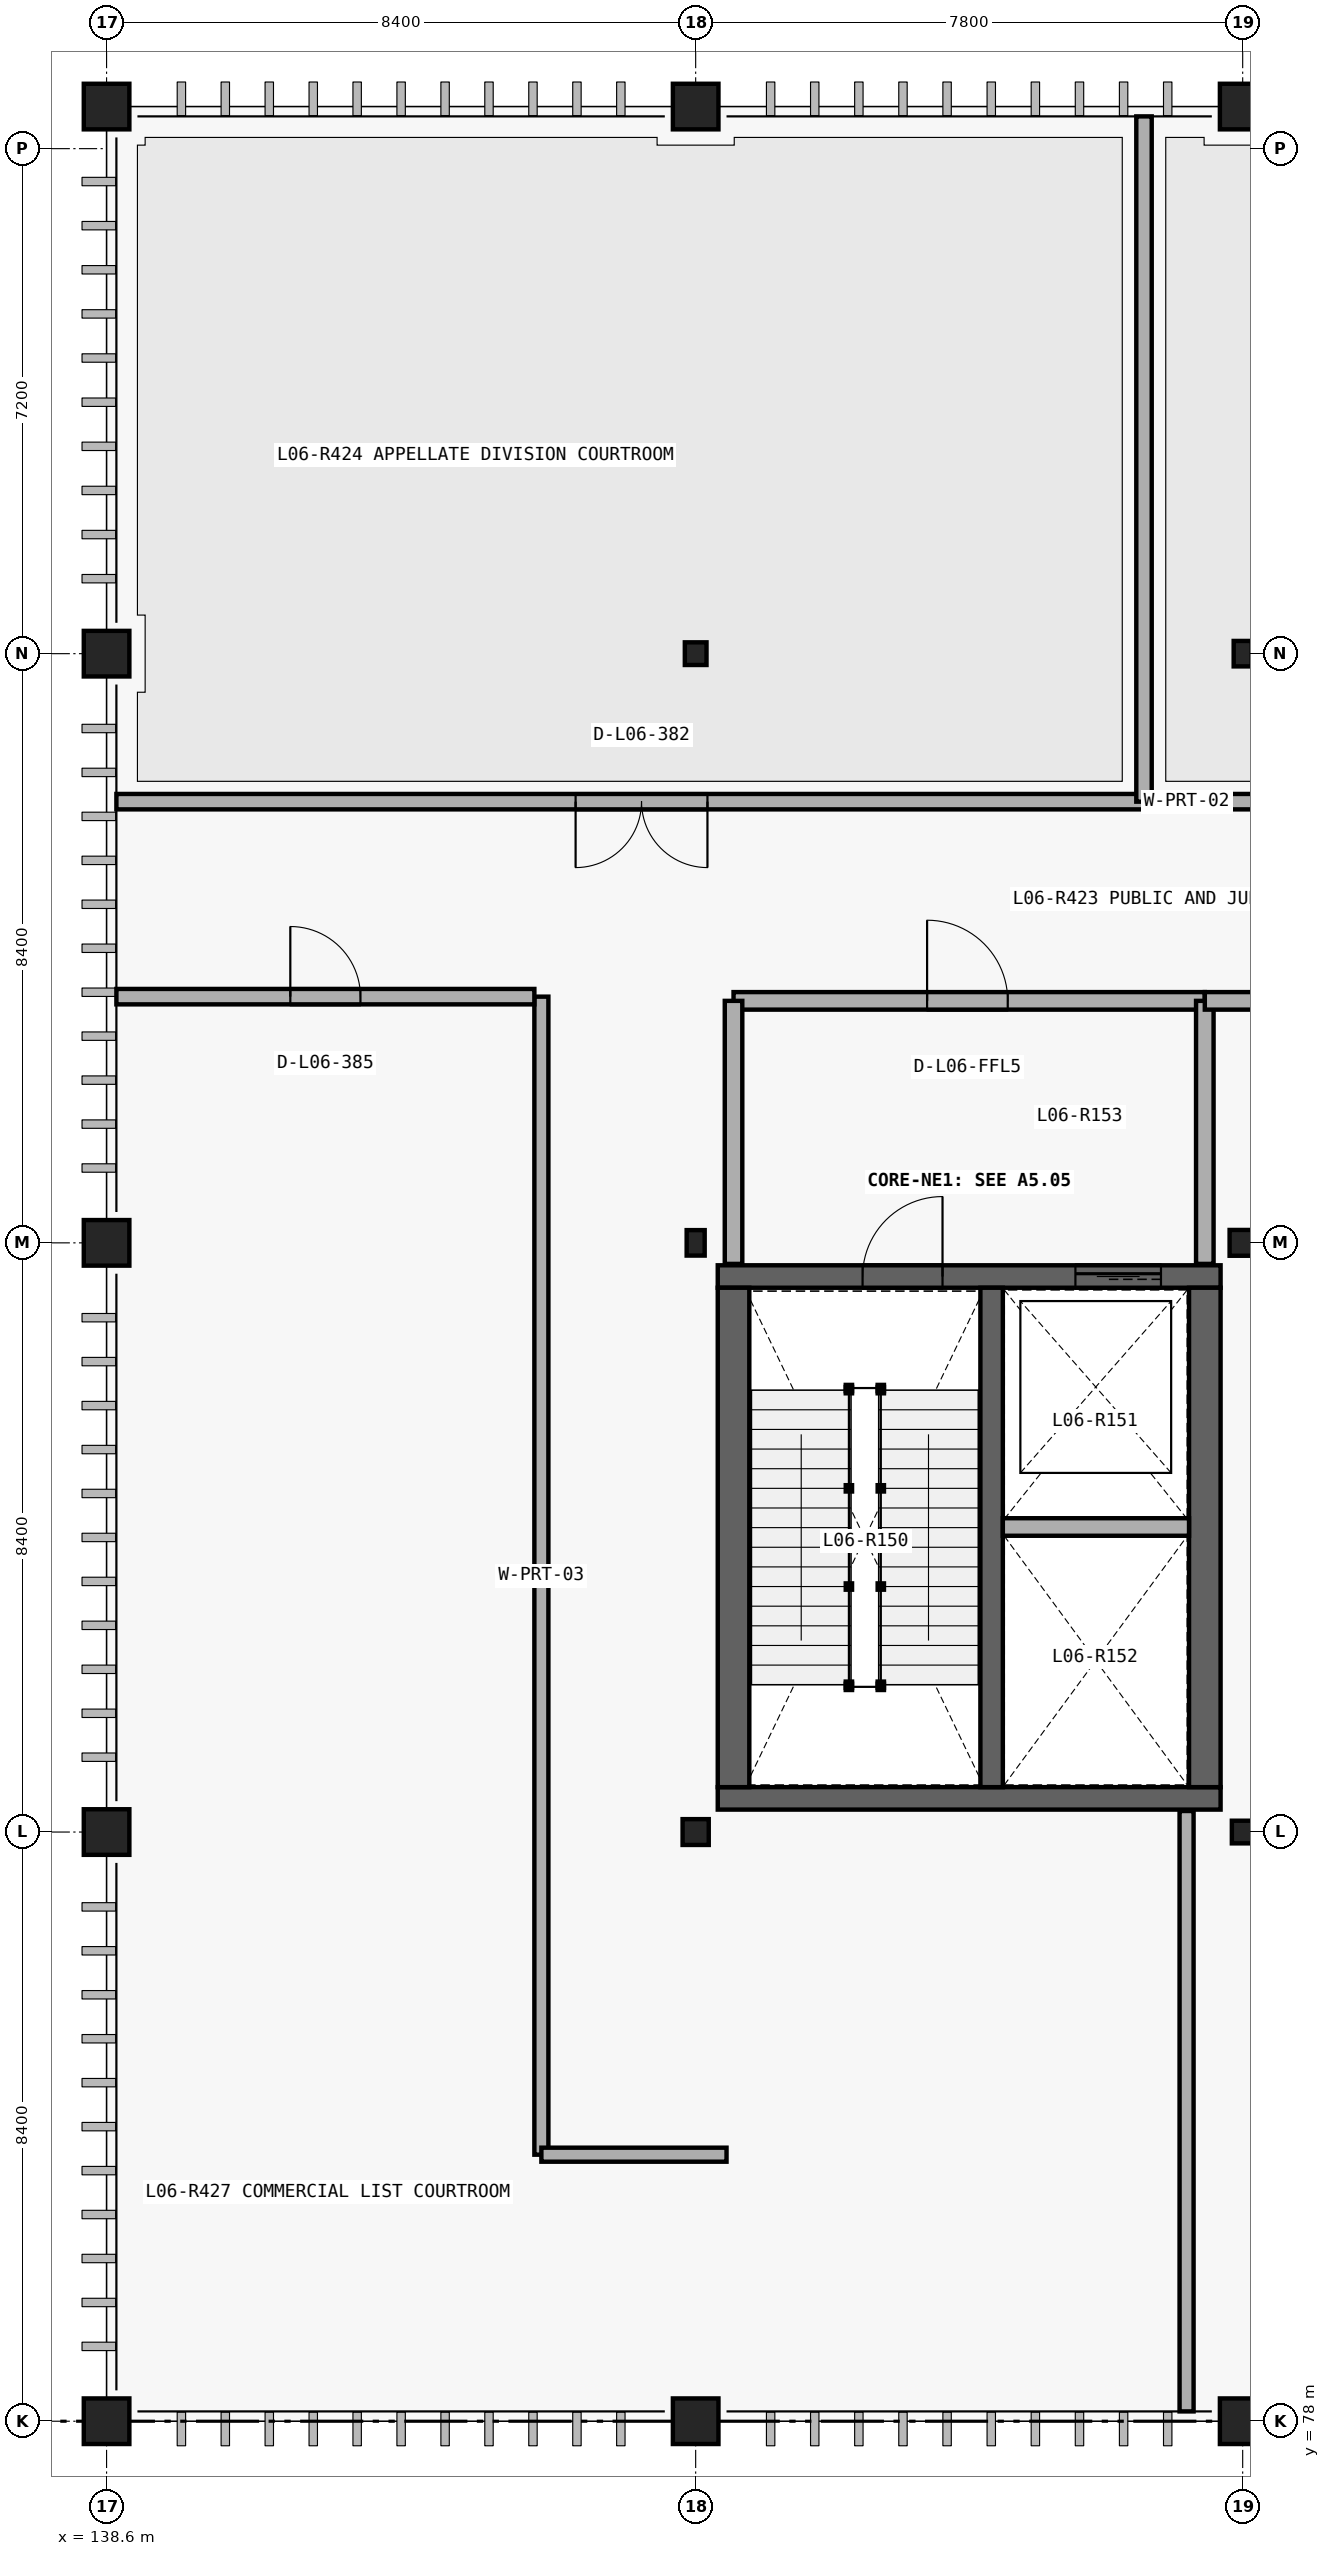
"""IFC4 building model, lengths in metres.
Left out: names, types, materials, properties, quantities, classifications, styles, units other than length and angle.
Written with IfcOpenShell. Run it as: python <this file> out.ifc"""

import sys

from ifc_helpers import new_model, si_unit, direction, frame, frame_2d, origin_with_axes, origin_2d_with_axis, place, context, subcontext, project, spatial, rectangle, circle, i_section, extrude, element, fill, save


model = new_model("IFC4")
c1 = context("Model", 3, precision=1e-05, world=origin_with_axes(), true_north=direction((0.0, 1.0)))
c2 = subcontext(c1, "Body", "Model", "MODEL_VIEW")
j1 = project(units=[si_unit("LENGTHUNIT", "METRE"), si_unit("PLANEANGLEUNIT", "RADIAN")], contexts=[c1])
p1 = place(None, origin_with_axes())
s1 = spatial("IfcSite", under=j1, at=p1, CompositionType="ELEMENT")
p2 = place(p1, origin_with_axes())
s2 = spatial("IfcBuilding", under=s1, at=p2, CompositionType="ELEMENT")
p3 = place(p2, frame((0.0, 0.0, 29.7), z_axis=(0.0, 0.0, 1.0), x_axis=(1.0, 0.0, 0.0)))
s3 = spatial("IfcBuildingStorey", under=s2, at=p3, CompositionType="ELEMENT", Elevation=29.7)
p4 = place(None, frame((147.315, 86.88, 29.7), z_axis=(0.0, 0.0, 1.0), x_axis=(1.0, 0.0, 0.0)))
e1 = element("IfcWall", 1, at=p4, inside=s3, PredefinedType="SHEAR", context=c2, shape_type="SweptSolid", body=[
    extrude(rectangle(XDim=7.17, YDim=0.32, at=frame_2d((3.585, 0.0), x_axis=(1.0, 0.0))), origin_with_axes(), (0.0, 0.0, 1.0), 4.8),
])
p5 = place(None, frame((154.485, 94.32, 29.7), z_axis=(0.0, 0.0, 1.0), x_axis=(-1.0, 0.0, 0.0)))
e2 = element("IfcWall", 2, at=p5, inside=s3, PredefinedType="SHEAR", context=c2, shape_type="SweptSolid", body=[
    extrude(rectangle(XDim=7.17, YDim=0.32, at=frame_2d((3.585, 0.0), x_axis=(1.0, 0.0))), origin_with_axes(), (0.0, 0.0, 1.0), 4.8),
])
p6 = place(None, frame((149.95, 94.32, 29.7), z_axis=(0.0, 0.0, 1.0), x_axis=(-1.0, 0.0, 0.0)))
e3 = element("IfcOpeningElement", 3, at=p6, cuts=e2, PredefinedType="OPENING", context=c2, shape_type="SweptSolid", body=[
    extrude(rectangle(XDim=1.14, YDim=2.18, at=frame_2d((0.0, 1.09), x_axis=(1.0, 0.0))), frame((0.0, 0.17, 0.0), z_axis=(0.0, -1.0, 0.0), x_axis=(1.0, 0.0, 0.0)), (0.0, 0.0, 1.0), 0.34),
])
p7 = place(None, frame((153.025, 94.32, 29.7), z_axis=(0.0, 0.0, 1.0), x_axis=(-1.0, 0.0, 0.0)))
e4 = element("IfcOpeningElement", 4, at=p7, cuts=e2, PredefinedType="OPENING", context=c2, shape_type="SweptSolid", body=[
    extrude(rectangle(XDim=1.22, YDim=2.28, at=frame_2d((0.0, 1.14), x_axis=(1.0, 0.0))), frame((0.0, 0.17, 0.0), z_axis=(0.0, -1.0, 0.0), x_axis=(1.0, 0.0, 0.0)), (0.0, 0.0, 1.0), 0.34),
])
for number, where, z_axis, x_axis in (
    (5, (154.26, 87.04, 29.7), (0.0, 0.0, 1.0), (0.0, 1.0, 0.0)),
    (6, (147.54, 94.16, 29.7), (0.0, 0.0, 1.0), (0.0, -1.0, 0.0)),
):
    element("IfcWall", number, at=place(None, frame(where, z_axis=z_axis, x_axis=x_axis)), inside=s3, PredefinedType="SHEAR", context=c2, shape_type="SweptSolid", body=[
        extrude(rectangle(XDim=7.12, YDim=0.45, at=frame_2d((3.56, 0.0), x_axis=(1.0, 0.0))), origin_with_axes(), (0.0, 0.0, 1.0), 4.8),
    ])
p8 = place(None, frame((151.22, 87.04, 29.7), z_axis=(0.0, 0.0, 1.0), x_axis=(0.0, 1.0, 0.0)))
e7 = element("IfcWall", 7, at=p8, inside=s3, PredefinedType="SHEAR", context=c2, shape_type="SweptSolid", body=[
    extrude(rectangle(XDim=7.12, YDim=0.32, at=frame_2d((3.56, 0.0), x_axis=(1.0, 0.0))), origin_with_axes(), (0.0, 0.0, 1.0), 4.8),
])
p9 = place(None, frame((151.38, 90.749, 29.7), z_axis=(0.0, 0.0, 1.0), x_axis=(1.0, 0.0, 0.0)))
e8 = element("IfcWall", 8, at=p9, inside=s3, PredefinedType="PARTITIONING", context=c2, shape_type="SweptSolid", body=[
    extrude(rectangle(XDim=2.655, YDim=0.25, at=frame_2d((1.327, 0.0), x_axis=(1.0, 0.0))), origin_with_axes(), (0.0, 0.0, 1.0), 4.48),
])
p10 = place(None, frame((154.26, 98.25, 29.7), z_axis=(0.0, 0.0, 1.0), x_axis=(-1.0, 0.0, 0.0)))
e9 = element("IfcWall", 9, at=p10, inside=s3, PredefinedType="PARTITIONING", context=c2, shape_type="SweptSolid", body=[
    extrude(rectangle(XDim=6.72, YDim=0.25, at=frame_2d((3.36, 0.0), x_axis=(1.0, 0.0))), origin_with_axes(), (0.0, 0.0, 1.0), 4.48),
])
p11 = place(None, frame((150.875, 98.25, 29.7), z_axis=(0.0, 0.0, 1.0), x_axis=(-1.0, 0.0, 0.0)))
e10 = element("IfcOpeningElement", 10, at=p11, cuts=e9, PredefinedType="OPENING", context=c2, shape_type="SweptSolid", body=[
    extrude(rectangle(XDim=1.15, YDim=2.25, at=frame_2d((0.0, 1.125), x_axis=(1.0, 0.0))), frame((0.0, 0.135, 0.0), z_axis=(0.0, -1.0, 0.0), x_axis=(1.0, 0.0, 0.0)), (0.0, 0.0, 1.0), 0.27),
])
for number, where, z_axis, x_axis in (
    (11, (147.54, 94.5, 29.7), (0.0, 0.0, 1.0), (0.0, 1.0, 0.0)),
    (12, (154.26, 94.5, 29.7), (0.0, 0.0, 1.0), (0.0, 1.0, 0.0)),
):
    element("IfcWall", number, at=place(None, frame(where, z_axis=z_axis, x_axis=x_axis)), inside=s3, PredefinedType="PARTITIONING", context=c2, shape_type="SweptSolid", body=[
        extrude(rectangle(XDim=3.75, YDim=0.25, at=frame_2d((1.875, 0.0), x_axis=(1.0, 0.0))), origin_with_axes(), (0.0, 0.0, 1.0), 4.48),
    ])
p12 = place(None, frame((154.26, 98.25, 29.7), z_axis=(0.0, 0.0, 1.0), x_axis=(1.0, 0.0, 0.0)))
e13 = element("IfcWall", 13, at=p12, inside=s3, PredefinedType="PARTITIONING", context=c2, shape_type="SweptSolid", body=[
    extrude(rectangle(XDim=1.08, YDim=0.25, at=frame_2d((0.54, 0.0), x_axis=(1.0, 0.0))), origin_with_axes(), (0.0, 0.0, 1.0), 4.48),
])
p13 = place(None, frame((144.8, 81.8, 29.7), z_axis=(0.0, 0.0, 1.0), x_axis=(0.0, 1.0, 0.0)))
e14 = element("IfcWall", 14, at=p13, inside=s3, PredefinedType="PARTITIONING", context=c2, shape_type="SweptSolid", body=[
    extrude(rectangle(XDim=16.51, YDim=0.2, at=frame_2d((8.255, 0.0), x_axis=(1.0, 0.0))), origin_with_axes(), (0.0, 0.0, 1.0), 4.48),
])
p14 = place(None, frame((144.8, 81.8, 29.7), z_axis=(0.0, 0.0, 1.0), x_axis=(1.0, 0.0, 0.0)))
e15 = element("IfcWall", 15, at=p14, inside=s3, PredefinedType="PARTITIONING", context=c2, shape_type="SweptSolid", body=[
    extrude(rectangle(XDim=2.64, YDim=0.2, at=frame_2d((1.32, 0.0), x_axis=(1.0, 0.0))), origin_with_axes(), (0.0, 0.0, 1.0), 4.48),
])
p15 = place(None, frame((138.74, 101.09, 29.7), z_axis=(0.0, 0.0, 1.0), x_axis=(1.0, 0.0, 0.0)))
e16 = element("IfcWall", 16, at=p15, inside=s3, PredefinedType="PARTITIONING", context=c2, shape_type="SweptSolid", body=[
    extrude(rectangle(XDim=30.52, YDim=0.22, at=frame_2d((15.26, 0.0), x_axis=(1.0, 0.0))), origin_with_axes(), (0.0, 0.0, 1.0), 4.48),
])
p16 = place(None, frame((146.228, 101.09, 29.7), z_axis=(0.0, 0.0, 1.0), x_axis=(1.0, 0.0, 0.0)))
e17 = element("IfcOpeningElement", 17, at=p16, cuts=e16, PredefinedType="OPENING", context=c2, shape_type="SweptSolid", body=[
    extrude(rectangle(XDim=1.88, YDim=2.56, at=frame_2d((0.0, 1.28), x_axis=(1.0, 0.0))), frame((0.0, 0.12, 0.0), z_axis=(0.0, -1.0, 0.0), x_axis=(1.0, 0.0, 0.0)), (0.0, 0.0, 1.0), 0.24),
])
p17 = place(None, frame((159.666, 101.09, 29.7), z_axis=(0.0, 0.0, 1.0), x_axis=(1.0, 0.0, 0.0)))
e18 = element("IfcOpeningElement", 18, at=p17, cuts=e16, PredefinedType="OPENING", context=c2, shape_type="SweptSolid", body=[
    extrude(rectangle(XDim=0.92, YDim=2.14, at=frame_2d((0.0, 1.07), x_axis=(1.0, 0.0))), frame((0.0, 0.12, 0.0), z_axis=(0.0, -1.0, 0.0), x_axis=(1.0, 0.0, 0.0)), (0.0, 0.0, 1.0), 0.24),
])
p18 = place(None, frame((167.438, 101.09, 29.7), z_axis=(0.0, 0.0, 1.0), x_axis=(1.0, 0.0, 0.0)))
e19 = element("IfcOpeningElement", 19, at=p18, cuts=e16, PredefinedType="OPENING", context=c2, shape_type="SweptSolid", body=[
    extrude(rectangle(XDim=0.91, YDim=2.12, at=frame_2d((0.0, 1.06), x_axis=(1.0, 0.0))), frame((0.0, 0.12, 0.0), z_axis=(0.0, -1.0, 0.0), x_axis=(1.0, 0.0, 0.0)), (0.0, 0.0, 1.0), 0.24),
])
p19 = place(None, frame((138.74, 98.31, 29.7), z_axis=(0.0, 0.0, 1.0), x_axis=(1.0, 0.0, 0.0)))
e20 = element("IfcWall", 20, at=p19, inside=s3, PredefinedType="PARTITIONING", context=c2, shape_type="SweptSolid", body=[
    extrude(rectangle(XDim=5.96, YDim=0.22, at=frame_2d((2.98, 0.0), x_axis=(1.0, 0.0))), origin_with_axes(), (0.0, 0.0, 1.0), 4.48),
])
p20 = place(None, frame((141.72, 98.31, 29.7), z_axis=(0.0, 0.0, 1.0), x_axis=(1.0, 0.0, 0.0)))
e21 = element("IfcOpeningElement", 21, at=p20, cuts=e20, PredefinedType="OPENING", context=c2, shape_type="SweptSolid", body=[
    extrude(rectangle(XDim=1.0, YDim=2.28, at=frame_2d((0.0, 1.14), x_axis=(1.0, 0.0))), frame((0.0, 0.12, 0.0), z_axis=(0.0, -1.0, 0.0), x_axis=(1.0, 0.0, 0.0)), (0.0, 0.0, 1.0), 0.24),
])
p21 = place(None, frame((153.393, 101.09, 29.7), z_axis=(0.0, 0.0, 1.0), x_axis=(0.0, 1.0, 0.0)))
e22 = element("IfcWall", 22, at=p21, inside=s3, PredefinedType="PARTITIONING", context=c2, shape_type="SweptSolid", body=[
    extrude(rectangle(XDim=9.77, YDim=0.22, at=frame_2d((4.885, 0.0), x_axis=(1.0, 0.0))), origin_with_axes(), (0.0, 0.0, 1.0), 4.48),
])
p22 = place(None, frame((154.0, 78.14, 29.7), z_axis=(0.0, 0.0, 1.0), x_axis=(0.0, 1.0, 0.0)))
e23 = element("IfcWall", 23, at=p22, inside=s3, PredefinedType="PARTITIONING", context=c2, shape_type="SweptSolid", body=[
    extrude(rectangle(XDim=8.56, YDim=0.2, at=frame_2d((4.28, 0.0), x_axis=(1.0, 0.0))), origin_with_axes(), (0.0, 0.0, 1.0), 4.48),
])
for number, where, z_axis, x_axis in (
    (24, (138.6, 78.0, 29.7), (0.0, 0.0, 1.0), (1.0, 0.0, 0.0)),
    (25, (138.6, 86.4, 29.7), (0.0, 0.0, 1.0), (1.0, 0.0, 0.0)),
    (26, (138.6, 94.8, 29.7), (0.0, 0.0, 1.0), (1.0, 0.0, 0.0)),
    (27, (138.6, 103.2, 29.7), (0.0, 0.0, 1.0), (1.0, 0.0, 0.0)),
    (28, (138.6, 111.0, 29.7), (0.0, 0.0, 1.0), (1.0, 0.0, 0.0)),
    (29, (147.0, 78.0, 29.7), (0.0, 0.0, 1.0), (1.0, 0.0, 0.0)),
):
    element("IfcColumn", number, at=place(None, frame(where, z_axis=z_axis, x_axis=x_axis)), inside=s3, PredefinedType="COLUMN", context=c2, shape_type="SweptSolid", body=[
        extrude(circle(Radius=0.325, at=origin_2d_with_axis()), origin_with_axes(), (0.0, 0.0, 1.0), 4.8),
    ])
p23 = place(None, frame((147.0, 86.4, 29.7), z_axis=(0.0, 0.0, 1.0), x_axis=(1.0, 0.0, 0.0)))
e30 = element("IfcColumn", 30, at=p23, inside=s3, PredefinedType="COLUMN", context=c2, shape_type="SweptSolid", body=[
    extrude(i_section(OverallWidth=0.373, OverallDepth=0.368, WebThickness=0.015, FlangeThickness=0.024, at=origin_2d_with_axis()), origin_with_axes(), (0.0, 0.0, 1.0), 4.8),
])
p24 = place(None, frame((147.0, 94.8, 29.7), z_axis=(0.0, 0.0, 1.0), x_axis=(1.0, 0.0, 0.0)))
e31 = element("IfcColumn", 31, at=p24, inside=s3, PredefinedType="COLUMN", context=c2, shape_type="SweptSolid", body=[
    extrude(i_section(OverallWidth=0.257, OverallDepth=0.363, WebThickness=0.013, FlangeThickness=0.022, at=origin_2d_with_axis()), origin_with_axes(), (0.0, 0.0, 1.0), 4.8),
])
p25 = place(None, frame((147.0, 103.2, 29.7), z_axis=(0.0, 0.0, 1.0), x_axis=(1.0, 0.0, 0.0)))
e32 = element("IfcColumn", 32, at=p25, inside=s3, PredefinedType="COLUMN", context=c2, shape_type="SweptSolid", body=[
    extrude(i_section(OverallWidth=0.309, OverallDepth=0.323, WebThickness=0.014, FlangeThickness=0.023, at=origin_2d_with_axis()), origin_with_axes(), (0.0, 0.0, 1.0), 4.8),
])
for number, where, z_axis, x_axis in (
    (33, (147.0, 111.0, 29.7), (0.0, 0.0, 1.0), (1.0, 0.0, 0.0)),
    (34, (154.8, 78.0, 29.7), (0.0, 0.0, 1.0), (1.0, 0.0, 0.0)),
):
    element("IfcColumn", number, at=place(None, frame(where, z_axis=z_axis, x_axis=x_axis)), inside=s3, PredefinedType="COLUMN", context=c2, shape_type="SweptSolid", body=[
        extrude(circle(Radius=0.325, at=origin_2d_with_axis()), origin_with_axes(), (0.0, 0.0, 1.0), 4.8),
    ])
p26 = place(None, frame((154.8, 86.4, 29.7), z_axis=(0.0, 0.0, 1.0), x_axis=(1.0, 0.0, 0.0)))
e35 = element("IfcColumn", 35, at=p26, inside=s3, PredefinedType="COLUMN", context=c2, shape_type="SweptSolid", body=[
    extrude(i_section(OverallWidth=0.309, OverallDepth=0.323, WebThickness=0.014, FlangeThickness=0.023, at=origin_2d_with_axis()), origin_with_axes(), (0.0, 0.0, 1.0), 4.8),
])
p27 = place(None, frame((154.8, 94.8, 29.7), z_axis=(0.0, 0.0, 1.0), x_axis=(1.0, 0.0, 0.0)))
e36 = element("IfcColumn", 36, at=p27, inside=s3, PredefinedType="COLUMN", context=c2, shape_type="SweptSolid", body=[
    extrude(i_section(OverallWidth=0.373, OverallDepth=0.368, WebThickness=0.015, FlangeThickness=0.024, at=origin_2d_with_axis()), origin_with_axes(), (0.0, 0.0, 1.0), 4.8),
])
p28 = place(None, frame((154.8, 103.2, 29.7), z_axis=(0.0, 0.0, 1.0), x_axis=(1.0, 0.0, 0.0)))
e37 = element("IfcColumn", 37, at=p28, inside=s3, PredefinedType="COLUMN", context=c2, shape_type="SweptSolid", body=[
    extrude(i_section(OverallWidth=0.257, OverallDepth=0.363, WebThickness=0.013, FlangeThickness=0.022, at=origin_2d_with_axis()), origin_with_axes(), (0.0, 0.0, 1.0), 4.8),
])
p29 = place(None, frame((154.8, 111.0, 29.7), z_axis=(0.0, 0.0, 1.0), x_axis=(1.0, 0.0, 0.0)))
e38 = element("IfcColumn", 38, at=p29, inside=s3, PredefinedType="COLUMN", context=c2, shape_type="SweptSolid", body=[
    extrude(circle(Radius=0.325, at=origin_2d_with_axis()), origin_with_axes(), (0.0, 0.0, 1.0), 4.8),
])
p30 = place(None, frame((149.95, 94.32, 29.7), z_axis=(0.0, 0.0, 1.0), x_axis=(1.0, 0.0, 0.0)))
e39 = element("IfcDoor", 39, at=p30, inside=s3, OperationType="SINGLE_SWING_LEFT", PredefinedType="DOOR", context=c2, shape_type="SweptSolid", body=[
    extrude(rectangle(XDim=1.14, YDim=2.18, at=frame_2d((0.0, 1.09), x_axis=(1.0, 0.0))), frame((0.0, 0.04, 0.0), z_axis=(0.0, -1.0, 0.0), x_axis=(1.0, 0.0, 0.0)), (0.0, 0.0, 1.0), 0.08),
])
fill(e3, e39)
p31 = place(None, frame((153.025, 94.32, 29.7), z_axis=(0.0, 0.0, 1.0), x_axis=(1.0, 0.0, 0.0)))
e40 = element("IfcDoor", 40, at=p31, inside=s3, OperationType="SLIDING_TO_LEFT", PredefinedType="DOOR", context=c2, shape_type="SweptSolid", body=[
    extrude(rectangle(XDim=1.22, YDim=2.28, at=frame_2d((0.0, 1.14), x_axis=(1.0, 0.0))), frame((0.0, 0.04, 0.0), z_axis=(0.0, -1.0, 0.0), x_axis=(1.0, 0.0, 0.0)), (0.0, 0.0, 1.0), 0.08),
])
fill(e4, e40)
p32 = place(None, frame((150.875, 98.25, 29.7), z_axis=(0.0, 0.0, 1.0), x_axis=(1.0, 0.0, 0.0)))
e41 = element("IfcDoor", 41, at=p32, inside=s3, OperationType="SINGLE_SWING_RIGHT", PredefinedType="DOOR", context=c2, shape_type="SweptSolid", body=[
    extrude(rectangle(XDim=1.15, YDim=2.25, at=frame_2d((0.0, 1.125), x_axis=(1.0, 0.0))), frame((0.0, 0.04, 0.0), z_axis=(0.0, -1.0, 0.0), x_axis=(1.0, 0.0, 0.0)), (0.0, 0.0, 1.0), 0.08),
])
fill(e10, e41)
p33 = place(None, frame((146.228, 101.09, 29.7), z_axis=(0.0, 0.0, 1.0), x_axis=(-1.0, 0.0, 0.0)))
e42 = element("IfcDoor", 42, at=p33, inside=s3, OperationType="DOUBLE_DOOR_SINGLE_SWING", PredefinedType="DOOR", context=c2, shape_type="SweptSolid", body=[
    extrude(rectangle(XDim=1.88, YDim=2.56, at=frame_2d((0.0, 1.28), x_axis=(1.0, 0.0))), frame((0.0, 0.04, 0.0), z_axis=(0.0, -1.0, 0.0), x_axis=(1.0, 0.0, 0.0)), (0.0, 0.0, 1.0), 0.08),
])
fill(e17, e42)
p34 = place(None, frame((141.72, 98.31, 29.7), z_axis=(0.0, 0.0, 1.0), x_axis=(1.0, 0.0, 0.0)))
e43 = element("IfcDoor", 43, at=p34, inside=s3, OperationType="SINGLE_SWING_LEFT", PredefinedType="DOOR", context=c2, shape_type="SweptSolid", body=[
    extrude(rectangle(XDim=1.0, YDim=2.28, at=frame_2d((0.0, 1.14), x_axis=(1.0, 0.0))), frame((0.0, 0.04, 0.0), z_axis=(0.0, -1.0, 0.0), x_axis=(1.0, 0.0, 0.0)), (0.0, 0.0, 1.0), 0.08),
])
fill(e21, e43)
save(model, sys.argv[1])
